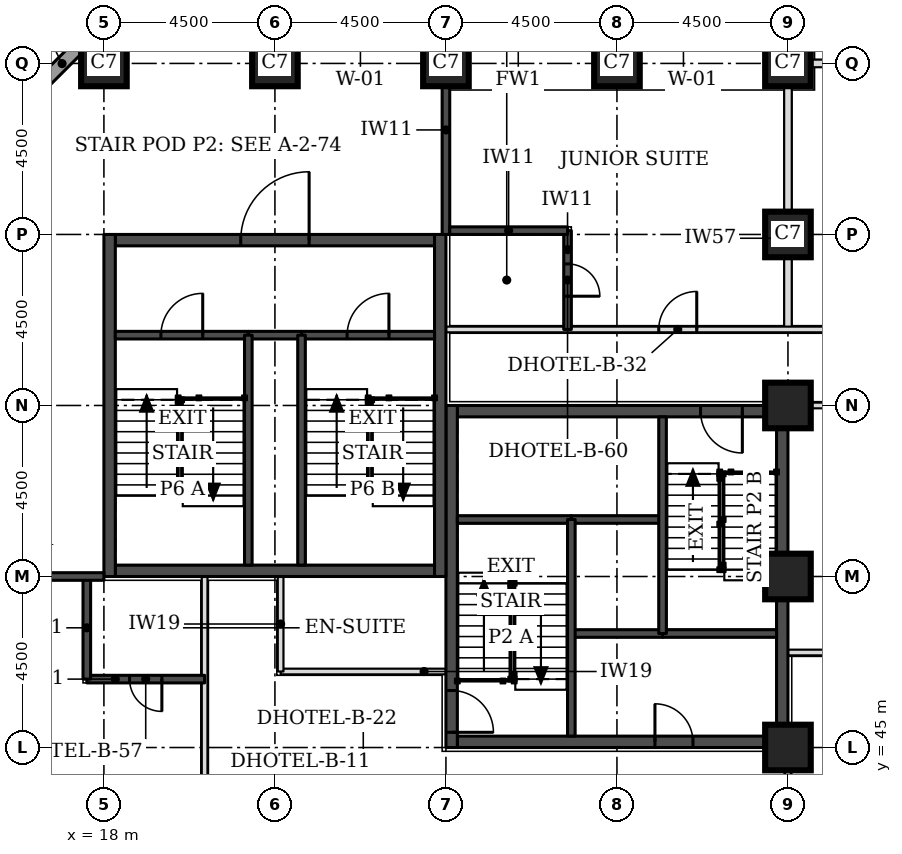
"""IFC4 building model, lengths in metres.
Left out: names, types, materials, properties, quantities, classifications, styles, units other than length and angle.
Written with IfcOpenShell. Run it as: python <this file> out.ifc"""

import sys

from ifc_helpers import new_model, si_unit, direction, frame, frame_2d, origin, origin_2d, place, context, subcontext, project, spatial, rectangle, extrude, element, fill, save


model = new_model("IFC4")
c1 = context("Model", 3, precision=1e-05, world=origin(), true_north=direction((0.0, 1.0)))
c2 = subcontext(c1, "Body", "Model", "MODEL_VIEW")
j1 = project(units=[si_unit("LENGTHUNIT", "METRE"), si_unit("PLANEANGLEUNIT", "RADIAN")], contexts=[c1])
p1 = place(None, origin())
s1 = spatial("IfcSite", under=j1, at=p1, CompositionType="ELEMENT")
p2 = place(p1, origin())
s2 = spatial("IfcBuilding", under=s1, at=p2, CompositionType="ELEMENT")
p3 = place(p2, frame((0.0, 0.0, 29.7)))
s3 = spatial("IfcBuildingStorey", under=s2, at=p3, CompositionType="ELEMENT", Elevation=29.7)
for number, where, z_axis, x_axis in (
    (1, (36.0, 45.0, 0.0), (0.0, 0.0, 1.0), (1.0, 0.0, 0.0)),
    (2, (36.0, 49.5, 0.0), (0.0, 0.0, 1.0), (1.0, 0.0, 0.0)),
    (3, (36.0, 54.0, 0.0), (0.0, 0.0, 1.0), (1.0, 0.0, 0.0)),
    (4, (36.0, 58.5, 0.0), (0.0, 0.0, 1.0), (1.0, 0.0, 0.0)),
    (5, (18.0, 63.0, 0.0), (0.0, 0.0, 1.0), (1.0, 0.0, 0.0)),
    (6, (22.5, 63.0, 0.0), (0.0, 0.0, 1.0), (1.0, 0.0, 0.0)),
    (7, (27.0, 63.0, 0.0), (0.0, 0.0, 1.0), (1.0, 0.0, 0.0)),
    (8, (31.5, 63.0, 0.0), (0.0, 0.0, 1.0), (1.0, 0.0, 0.0)),
    (9, (36.0, 63.0, 0.0), (0.0, 0.0, 1.0), (1.0, 0.0, 0.0)),
):
    element("IfcColumn", number, at=place(p3, frame(where, z_axis=z_axis, x_axis=x_axis)), inside=s3, PredefinedType="COLUMN", context=c2, shape_type="SweptSolid", body=[
        extrude(rectangle(XDim=1.2, YDim=1.2, at=origin_2d()), origin(), (0.0, 0.0, 1.0), 3.3),
    ])
p4 = place(p3, frame((27.3, 45.15, 0.0), z_axis=(0.0, 0.0, 1.0), x_axis=(1.0, 0.0, 0.0)))
e10 = element("IfcWall", 10, at=p4, inside=s3, PredefinedType="SHEAR", context=c2, shape_type="SweptSolid", body=[
    extrude(rectangle(XDim=8.4, YDim=0.3, at=frame_2d((4.2, 0.0))), origin(), (0.0, 0.0, 1.0), 3.3),
])
p5 = place(p4, frame((5.2, 0.0, 0.0)))
e11 = element("IfcOpeningElement", 11, at=p5, cuts=e10, PredefinedType="OPENING", context=c2, shape_type="SweptSolid", body=[
    extrude(rectangle(XDim=1.0, YDim=2.1, at=frame_2d((0.5, 1.05))), frame((0.0, 0.16, 0.0), z_axis=(0.0, -1.0, 0.0), x_axis=(1.0, 0.0, 0.0)), (0.0, 0.0, 1.0), 0.32),
])
p6 = place(p3, frame((27.3, 53.85, 0.0), z_axis=(0.0, 0.0, 1.0), x_axis=(1.0, 0.0, 0.0)))
e12 = element("IfcWall", 12, at=p6, inside=s3, PredefinedType="SHEAR", context=c2, shape_type="SweptSolid", body=[
    extrude(rectangle(XDim=8.4, YDim=0.3, at=frame_2d((4.2, 0.0))), origin(), (0.0, 0.0, 1.0), 3.3),
])
p7 = place(p6, frame((6.4, 0.0, 0.0)))
e13 = element("IfcOpeningElement", 13, at=p7, cuts=e12, PredefinedType="OPENING", context=c2, shape_type="SweptSolid", body=[
    extrude(rectangle(XDim=1.1, YDim=2.1, at=frame_2d((0.55, 1.05))), frame((0.0, 0.16, 0.0), z_axis=(0.0, -1.0, 0.0), x_axis=(1.0, 0.0, 0.0)), (0.0, 0.0, 1.0), 0.32),
])
p8 = place(p3, frame((27.15, 45.0, 0.0), z_axis=(0.0, 0.0, 1.0), x_axis=(0.0, 1.0, 0.0)))
e14 = element("IfcWall", 14, at=p8, inside=s3, PredefinedType="SHEAR", context=c2, shape_type="SweptSolid", body=[
    extrude(rectangle(XDim=9.0, YDim=0.3, at=frame_2d((4.5, 0.0))), origin(), (0.0, 0.0, 1.0), 3.3),
])
p9 = place(p8, frame((0.4, 0.0, 0.0)))
e15 = element("IfcOpeningElement", 15, at=p9, cuts=e14, PredefinedType="OPENING", context=c2, shape_type="SweptSolid", body=[
    extrude(rectangle(XDim=1.1, YDim=2.1, at=frame_2d((0.55, 1.05))), frame((0.0, 0.16, 0.0), z_axis=(0.0, -1.0, 0.0), x_axis=(1.0, 0.0, 0.0)), (0.0, 0.0, 1.0), 0.32),
])
p10 = place(p3, frame((35.85, 45.0, 0.0), z_axis=(0.0, 0.0, 1.0), x_axis=(0.0, 1.0, 0.0)))
e16 = element("IfcWall", 16, at=p10, inside=s3, PredefinedType="SHEAR", context=c2, shape_type="SweptSolid", body=[
    extrude(rectangle(XDim=9.0, YDim=0.3, at=frame_2d((4.5, 0.0))), origin(), (0.0, 0.0, 1.0), 3.3),
])
p11 = place(p3, frame((18.3, 49.65, 0.0), z_axis=(0.0, 0.0, 1.0), x_axis=(1.0, 0.0, 0.0)))
e17 = element("IfcWall", 17, at=p11, inside=s3, PredefinedType="SHEAR", context=c2, shape_type="SweptSolid", body=[
    extrude(rectangle(XDim=8.4, YDim=0.3, at=frame_2d((4.2, 0.0))), origin(), (0.0, 0.0, 1.0), 3.3),
])
p12 = place(p3, frame((18.3, 58.35, 0.0), z_axis=(0.0, 0.0, 1.0), x_axis=(1.0, 0.0, 0.0)))
e18 = element("IfcWall", 18, at=p12, inside=s3, PredefinedType="SHEAR", context=c2, shape_type="SweptSolid", body=[
    extrude(rectangle(XDim=8.4, YDim=0.3, at=frame_2d((4.2, 0.0))), origin(), (0.0, 0.0, 1.0), 3.3),
])
p13 = place(p12, frame((3.3, 0.0, 0.0)))
e19 = element("IfcOpeningElement", 19, at=p13, cuts=e18, PredefinedType="OPENING", context=c2, shape_type="SweptSolid", body=[
    extrude(rectangle(XDim=1.8, YDim=2.1, at=frame_2d((0.9, 1.05))), frame((0.0, 0.16, 0.0), z_axis=(0.0, -1.0, 0.0), x_axis=(1.0, 0.0, 0.0)), (0.0, 0.0, 1.0), 0.32),
])
for number, where, z_axis, x_axis in (
    (20, (18.15, 49.5, 0.0), (0.0, 0.0, 1.0), (0.0, 1.0, 0.0)),
    (21, (26.85, 49.5, 0.0), (0.0, 0.0, 1.0), (0.0, 1.0, 0.0)),
):
    element("IfcWall", number, at=place(p3, frame(where, z_axis=z_axis, x_axis=x_axis)), inside=s3, PredefinedType="SHEAR", context=c2, shape_type="SweptSolid", body=[
        extrude(rectangle(XDim=9.0, YDim=0.3, at=frame_2d((4.5, 0.0))), origin(), (0.0, 0.0, 1.0), 3.3),
    ])
p14 = place(p3, frame((17.73, 63.826, 0.0), z_axis=(0.0, 0.0, 1.0), x_axis=(-0.707106781187, -0.707106781187, 0.0)))
e22 = element("IfcWall", 22, at=p14, inside=s3, PredefinedType="STANDARD", context=c2, shape_type="SweptSolid", body=[
    extrude(rectangle(XDim=7.151, YDim=0.35, at=frame_2d((3.576, 0.0))), origin(), (0.0, 0.0, 1.0), 3.055),
])
p15 = place(p14, frame((1.926, 0.0, 0.8)))
e23 = element("IfcOpeningElement", 23, at=p15, cuts=e22, PredefinedType="OPENING", context=c2, shape_type="SweptSolid", body=[
    extrude(rectangle(XDim=3.3, YDim=1.5, at=frame_2d((1.65, 0.75))), frame((0.0, 0.185, 0.0), z_axis=(0.0, -1.0, 0.0), x_axis=(1.0, 0.0, 0.0)), (0.0, 0.0, 1.0), 0.37),
])
p16 = place(p3, frame((36.0, 56.0, 0.0), z_axis=(0.0, 0.0, 1.0), x_axis=(0.0, 1.0, 0.0)))
e24 = element("IfcWall", 24, at=p16, inside=s3, PredefinedType="PARTITIONING", context=c2, shape_type="SweptSolid", body=[
    extrude(rectangle(XDim=6.4, YDim=0.2, at=frame_2d((3.2, 0.0))), origin(), (0.0, 0.0, 1.0), 2.33),
])
p17 = place(p3, frame((36.6, 63.0, 0.0), z_axis=(0.0, 0.0, 1.0), x_axis=(1.0, 0.0, 0.0)))
e25 = element("IfcWall", 25, at=p17, inside=s3, PredefinedType="PARTITIONING", context=c2, shape_type="SweptSolid", body=[
    extrude(rectangle(XDim=6.4, YDim=0.2, at=frame_2d((3.2, 0.0))), origin(), (0.0, 0.0, 1.0), 3.08),
])
p18 = place(p3, frame((20.65, 23.65, 0.0), z_axis=(0.0, 0.0, 1.0), x_axis=(0.0, 1.0, 0.0)))
e26 = element("IfcWall", 26, at=p18, inside=s3, PredefinedType="PARTITIONING", context=c2, shape_type="SweptSolid", body=[
    extrude(rectangle(XDim=25.85, YDim=0.15, at=frame_2d((12.925, 0.0))), origin(), (0.0, 0.0, 1.0), 3.08),
])
p19 = place(p18, frame((1.5, 0.0, 0.0)))
e27 = element("IfcOpeningElement", 27, at=p19, cuts=e26, PredefinedType="OPENING", context=c2, shape_type="SweptSolid", body=[
    extrude(rectangle(XDim=1.0, YDim=2.1, at=frame_2d((0.5, 1.05))), frame((0.0, 0.085, 0.0), z_axis=(0.0, -1.0, 0.0), x_axis=(1.0, 0.0, 0.0)), (0.0, 0.0, 1.0), 0.17),
])
p20 = place(p18, frame((13.45, 0.0, 0.0)))
e28 = element("IfcOpeningElement", 28, at=p20, cuts=e26, PredefinedType="OPENING", context=c2, shape_type="SweptSolid", body=[
    extrude(rectangle(XDim=1.0, YDim=2.1, at=frame_2d((0.5, 1.05))), frame((0.0, 0.085, 0.0), z_axis=(0.0, -1.0, 0.0), x_axis=(1.0, 0.0, 0.0)), (0.0, 0.0, 1.0), 0.17),
])
p21 = place(p18, frame((19.5, 0.0, 0.0)))
e29 = element("IfcOpeningElement", 29, at=p21, cuts=e26, PredefinedType="OPENING", context=c2, shape_type="SweptSolid", body=[
    extrude(rectangle(XDim=1.0, YDim=2.1, at=frame_2d((0.5, 1.05))), frame((0.0, 0.085, 0.0), z_axis=(0.0, -1.0, 0.0), x_axis=(1.0, 0.0, 0.0)), (0.0, 0.0, 1.0), 0.17),
])
p22 = place(p3, frame((36.0, 40.55, 0.0), z_axis=(0.0, 0.0, 1.0), x_axis=(0.0, 1.0, 0.0)))
e30 = element("IfcWall", 30, at=p22, inside=s3, PredefinedType="PARTITIONING", context=c2, shape_type="SweptSolid", body=[
    extrude(rectangle(XDim=4.4, YDim=0.15, at=frame_2d((2.2, 0.0))), origin(), (0.0, 0.0, 1.0), 2.33),
])
p23 = place(p3, frame((22.65, 47.0, 0.0), z_axis=(0.0, 0.0, 1.0), x_axis=(1.0, 0.0, 0.0)))
e31 = element("IfcWall", 31, at=p23, inside=s3, PredefinedType="PARTITIONING", context=c2, shape_type="SweptSolid", body=[
    extrude(rectangle(XDim=4.35, YDim=0.15, at=frame_2d((2.175, 0.0))), origin(), (0.0, 0.0, 1.0), 3.08),
])
p24 = place(p3, frame((22.65, 47.0, 0.0), z_axis=(0.0, 0.0, 1.0), x_axis=(0.0, 1.0, 0.0)))
e32 = element("IfcWall", 32, at=p24, inside=s3, PredefinedType="PARTITIONING", context=c2, shape_type="SweptSolid", body=[
    extrude(rectangle(XDim=2.5, YDim=0.15, at=frame_2d((1.25, 0.0))), origin(), (0.0, 0.0, 1.0), 3.08),
])
p25 = place(p3, frame((36.05, 54.0, 0.0), z_axis=(0.0, 0.0, 1.0), x_axis=(1.0, 0.0, 0.0)))
e33 = element("IfcWall", 33, at=p25, inside=s3, PredefinedType="PARTITIONING", context=c2, shape_type="SweptSolid", body=[
    extrude(rectangle(XDim=6.95, YDim=0.15, at=frame_2d((3.475, 0.0))), origin(), (0.0, 0.0, 1.0), 3.08),
])
p26 = place(p3, frame((27.0, 56.0, 0.0), z_axis=(0.0, 0.0, 1.0), x_axis=(1.0, 0.0, 0.0)))
e34 = element("IfcWall", 34, at=p26, inside=s3, PredefinedType="PARTITIONING", context=c2, shape_type="SweptSolid", body=[
    extrude(rectangle(XDim=16.0, YDim=0.15, at=frame_2d((8.0, 0.0))), origin(), (0.0, 0.0, 1.0), 3.08),
])
p27 = place(p26, frame((5.6, 0.0, 0.0)))
e35 = element("IfcOpeningElement", 35, at=p27, cuts=e34, PredefinedType="OPENING", context=c2, shape_type="SweptSolid", body=[
    extrude(rectangle(XDim=1.0, YDim=2.1, at=frame_2d((0.5, 1.05))), frame((0.0, 0.085, 0.0), z_axis=(0.0, -1.0, 0.0), x_axis=(1.0, 0.0, 0.0)), (0.0, 0.0, 1.0), 0.17),
])
p28 = place(p3, frame((17.55, 46.8, 0.0), z_axis=(0.0, 0.0, 1.0), x_axis=(1.0, 0.0, 0.0)))
e36 = element("IfcWall", 36, at=p28, inside=s3, PredefinedType="SOLIDWALL", context=c2, shape_type="SweptSolid", body=[
    extrude(rectangle(XDim=3.1, YDim=0.2, at=frame_2d((1.55, 0.0))), origin(), (0.0, 0.0, 1.0), 3.08),
])
p29 = place(p28, frame((1.125, 0.0, 0.0)))
e37 = element("IfcOpeningElement", 37, at=p29, cuts=e36, PredefinedType="OPENING", context=c2, shape_type="SweptSolid", body=[
    extrude(rectangle(XDim=0.85, YDim=2.1, at=frame_2d((0.425, 1.05))), frame((0.0, 0.11, 0.0), z_axis=(0.0, -1.0, 0.0), x_axis=(1.0, 0.0, 0.0)), (0.0, 0.0, 1.0), 0.22),
])
p30 = place(p3, frame((17.55, 46.8, 0.0), z_axis=(0.0, 0.0, 1.0), x_axis=(0.0, 1.0, 0.0)))
e38 = element("IfcWall", 38, at=p30, inside=s3, PredefinedType="SOLIDWALL", context=c2, shape_type="SweptSolid", body=[
    extrude(rectangle(XDim=2.7, YDim=0.2, at=frame_2d((1.35, 0.0))), origin(), (0.0, 0.0, 1.0), 3.08),
])
for number, where, z_axis, x_axis in (
    (39, (14.1, 49.5, 0.0), (0.0, 0.0, 1.0), (1.0, 0.0, 0.0)),
    (40, (27.0, 58.5, 0.0), (0.0, 0.0, 1.0), (0.0, 1.0, 0.0)),
):
    element("IfcWall", number, at=place(p3, frame(where, z_axis=z_axis, x_axis=x_axis)), inside=s3, PredefinedType="SOLIDWALL", context=c2, shape_type="SweptSolid", body=[
        extrude(rectangle(XDim=3.9, YDim=0.2, at=frame_2d((1.95, 0.0))), origin(), (0.0, 0.0, 1.0), 3.08),
    ])
p31 = place(p3, frame((30.2, 56.0, 0.0), z_axis=(0.0, 0.0, 1.0), x_axis=(0.0, 1.0, 0.0)))
e41 = element("IfcWall", 41, at=p31, inside=s3, PredefinedType="SOLIDWALL", context=c2, shape_type="SweptSolid", body=[
    extrude(rectangle(XDim=2.6, YDim=0.2, at=frame_2d((1.3, 0.0))), origin(), (0.0, 0.0, 1.0), 3.08),
])
p32 = place(p31, frame((0.875, 0.0, 0.0)))
e42 = element("IfcOpeningElement", 42, at=p32, cuts=e41, PredefinedType="OPENING", context=c2, shape_type="SweptSolid", body=[
    extrude(rectangle(XDim=0.85, YDim=2.1, at=frame_2d((0.425, 1.05))), frame((0.0, 0.11, 0.0), z_axis=(0.0, -1.0, 0.0), x_axis=(1.0, 0.0, 0.0)), (0.0, 0.0, 1.0), 0.22),
])
p33 = place(p3, frame((27.1, 58.6, 0.0), z_axis=(0.0, 0.0, 1.0), x_axis=(1.0, 0.0, 0.0)))
e43 = element("IfcWall", 43, at=p33, inside=s3, PredefinedType="SOLIDWALL", context=c2, shape_type="SweptSolid", body=[
    extrude(rectangle(XDim=3.1, YDim=0.2, at=frame_2d((1.55, 0.0))), origin(), (0.0, 0.0, 1.0), 3.08),
])
p34 = place(p3, frame((36.0, 47.5, 0.0), z_axis=(0.0, 0.0, 1.0), x_axis=(1.0, 0.0, 0.0)))
e44 = element("IfcWall", 44, at=p34, inside=s3, PredefinedType="PARTITIONING", context=c2, shape_type="SweptSolid", body=[
    extrude(rectangle(XDim=7.0, YDim=0.15, at=frame_2d((3.5, 0.0))), origin(), (0.0, 0.0, 1.0), 3.08),
])
p35 = place(p3, frame((30.3, 48.0, 0.0), z_axis=(0.0, 0.0, 1.0), x_axis=(1.0, 0.0, 0.0)))
e45 = element("IfcWall", 45, at=p35, inside=s3, PredefinedType="SOLIDWALL", context=c2, shape_type="SweptSolid", body=[
    extrude(rectangle(XDim=2.4, YDim=0.2, at=frame_2d((1.2, 0.0))), origin(), (0.0, 0.0, 1.0), 3.08),
])
p36 = place(p3, frame((32.7, 48.0, 0.0), z_axis=(0.0, 0.0, 1.0), x_axis=(1.0, 0.0, 0.0)))
e46 = element("IfcWall", 46, at=p36, inside=s3, PredefinedType="SOLIDWALL", context=c2, shape_type="SweptSolid", body=[
    extrude(rectangle(XDim=3.0, YDim=0.2, at=frame_2d((1.5, 0.0))), origin(), (0.0, 0.0, 1.0), 3.08),
])
p37 = place(p3, frame((30.3, 51.0, 0.0), z_axis=(0.0, 0.0, 1.0), x_axis=(1.0, 0.0, 0.0)))
e47 = element("IfcWall", 47, at=p37, inside=s3, PredefinedType="SOLIDWALL", context=c2, shape_type="SweptSolid", body=[
    extrude(rectangle(XDim=2.4, YDim=0.2, at=frame_2d((1.2, 0.0))), origin(), (0.0, 0.0, 1.0), 3.3),
])
p38 = place(p3, frame((27.3, 51.0, 0.0), z_axis=(0.0, 0.0, 1.0), x_axis=(1.0, 0.0, 0.0)))
e48 = element("IfcWall", 48, at=p38, inside=s3, PredefinedType="SOLIDWALL", context=c2, shape_type="SweptSolid", body=[
    extrude(rectangle(XDim=3.0, YDim=0.2, at=frame_2d((1.5, 0.0))), origin(), (0.0, 0.0, 1.0), 3.08),
])
for number, where, z_axis, x_axis in (
    (49, (30.3, 45.3, 0.0), (0.0, 0.0, 1.0), (0.0, 1.0, 0.0)),
    (50, (32.7, 48.0, 0.0), (0.0, 0.0, 1.0), (0.0, 1.0, 0.0)),
):
    element("IfcWall", number, at=place(p3, frame(where, z_axis=z_axis, x_axis=x_axis)), inside=s3, PredefinedType="SOLIDWALL", context=c2, shape_type="SweptSolid", body=[
        extrude(rectangle(XDim=5.7, YDim=0.2, at=frame_2d((2.85, 0.0))), origin(), (0.0, 0.0, 1.0), 3.08),
    ])
p39 = place(p3, frame((21.8, 55.85, 0.0), z_axis=(0.0, 0.0, 1.0), x_axis=(1.0, 0.0, 0.0)))
e51 = element("IfcWall", 51, at=p39, inside=s3, PredefinedType="SOLIDWALL", context=c2, shape_type="SweptSolid", body=[
    extrude(rectangle(XDim=1.4, YDim=0.2, at=frame_2d((0.7, 0.0))), origin(), (0.0, 0.0, 1.0), 3.08),
])
p40 = place(p3, frame((18.3, 55.85, 0.0), z_axis=(0.0, 0.0, 1.0), x_axis=(1.0, 0.0, 0.0)))
e52 = element("IfcWall", 52, at=p40, inside=s3, PredefinedType="SOLIDWALL", context=c2, shape_type="SweptSolid", body=[
    extrude(rectangle(XDim=3.5, YDim=0.2, at=frame_2d((1.75, 0.0))), origin(), (0.0, 0.0, 1.0), 3.08),
])
p41 = place(p40, frame((1.2, 0.0, 0.0)))
e53 = element("IfcOpeningElement", 53, at=p41, cuts=e52, PredefinedType="OPENING", context=c2, shape_type="SweptSolid", body=[
    extrude(rectangle(XDim=1.1, YDim=2.1, at=frame_2d((0.55, 1.05))), frame((0.0, 0.11, 0.0), z_axis=(0.0, -1.0, 0.0), x_axis=(1.0, 0.0, 0.0)), (0.0, 0.0, 1.0), 0.22),
])
p42 = place(p3, frame((23.2, 55.85, 0.0), z_axis=(0.0, 0.0, 1.0), x_axis=(1.0, 0.0, 0.0)))
e54 = element("IfcWall", 54, at=p42, inside=s3, PredefinedType="SOLIDWALL", context=c2, shape_type="SweptSolid", body=[
    extrude(rectangle(XDim=3.5, YDim=0.2, at=frame_2d((1.75, 0.0))), origin(), (0.0, 0.0, 1.0), 3.08),
])
p43 = place(p42, frame((1.2, 0.0, 0.0)))
e55 = element("IfcOpeningElement", 55, at=p43, cuts=e54, PredefinedType="OPENING", context=c2, shape_type="SweptSolid", body=[
    extrude(rectangle(XDim=1.1, YDim=2.1, at=frame_2d((0.55, 1.05))), frame((0.0, 0.11, 0.0), z_axis=(0.0, -1.0, 0.0), x_axis=(1.0, 0.0, 0.0)), (0.0, 0.0, 1.0), 0.22),
])
for number, where, z_axis, x_axis in (
    (56, (21.8, 49.8, 0.0), (0.0, 0.0, 1.0), (0.0, 1.0, 0.0)),
    (57, (23.2, 49.8, 0.0), (0.0, 0.0, 1.0), (0.0, 1.0, 0.0)),
):
    element("IfcWall", number, at=place(p3, frame(where, z_axis=z_axis, x_axis=x_axis)), inside=s3, PredefinedType="SOLIDWALL", context=c2, shape_type="SweptSolid", body=[
        extrude(rectangle(XDim=6.05, YDim=0.2, at=frame_2d((3.025, 0.0))), origin(), (0.0, 0.0, 1.0), 3.08),
    ])
p44 = place(p29, frame((0.85, 0.0, 0.0), z_axis=(0.0, 0.0, 1.0), x_axis=(-1.0, 0.0, 0.0)))
e58 = element("IfcDoor", 58, at=p44, inside=s3, OperationType="SINGLE_SWING_LEFT", PredefinedType="DOOR", context=c2, shape_type="SweptSolid", body=[
    extrude(rectangle(XDim=0.85, YDim=2.1, at=frame_2d((0.425, 1.05))), frame((0.0, 0.025, 0.0), z_axis=(0.0, -1.0, 0.0), x_axis=(1.0, 0.0, 0.0)), (0.0, 0.0, 1.0), 0.05),
])
fill(e37, e58)
p45 = place(p27, origin())
e59 = element("IfcDoor", 59, at=p45, inside=s3, OperationType="SINGLE_SWING_RIGHT", PredefinedType="DOOR", context=c2, shape_type="SweptSolid", body=[
    extrude(rectangle(XDim=1.0, YDim=2.1, at=frame_2d((0.5, 1.05))), frame((0.0, 0.025, 0.0), z_axis=(0.0, -1.0, 0.0), x_axis=(1.0, 0.0, 0.0)), (0.0, 0.0, 1.0), 0.05),
])
fill(e35, e59)
p46 = place(p32, frame((0.85, 0.0, 0.0), z_axis=(0.0, 0.0, 1.0), x_axis=(-1.0, 0.0, 0.0)))
e60 = element("IfcDoor", 60, at=p46, inside=s3, OperationType="SINGLE_SWING_RIGHT", PredefinedType="DOOR", context=c2, shape_type="SweptSolid", body=[
    extrude(rectangle(XDim=0.85, YDim=2.1, at=frame_2d((0.425, 1.05))), frame((0.0, 0.025, 0.0), z_axis=(0.0, -1.0, 0.0), x_axis=(1.0, 0.0, 0.0)), (0.0, 0.0, 1.0), 0.05),
])
fill(e42, e60)
p47 = place(p9, frame((1.1, 0.0, 0.0), z_axis=(0.0, 0.0, 1.0), x_axis=(-1.0, 0.0, 0.0)))
e61 = element("IfcDoor", 61, at=p47, inside=s3, OperationType="SINGLE_SWING_RIGHT", PredefinedType="DOOR", context=c2, shape_type="SweptSolid", body=[
    extrude(rectangle(XDim=1.1, YDim=2.1, at=frame_2d((0.55, 1.05))), frame((0.0, 0.025, 0.0), z_axis=(0.0, -1.0, 0.0), x_axis=(1.0, 0.0, 0.0)), (0.0, 0.0, 1.0), 0.05),
])
fill(e15, e61)
p48 = place(p7, frame((1.1, 0.0, 0.0), z_axis=(0.0, 0.0, 1.0), x_axis=(-1.0, 0.0, 0.0)))
e62 = element("IfcDoor", 62, at=p48, inside=s3, OperationType="SINGLE_SWING_LEFT", PredefinedType="DOOR", context=c2, shape_type="SweptSolid", body=[
    extrude(rectangle(XDim=1.1, YDim=2.1, at=frame_2d((0.55, 1.05))), frame((0.0, 0.025, 0.0), z_axis=(0.0, -1.0, 0.0), x_axis=(1.0, 0.0, 0.0)), (0.0, 0.0, 1.0), 0.05),
])
fill(e13, e62)
p49 = place(p5, origin())
e63 = element("IfcDoor", 63, at=p49, inside=s3, OperationType="SINGLE_SWING_LEFT", PredefinedType="DOOR", context=c2, shape_type="SweptSolid", body=[
    extrude(rectangle(XDim=1.0, YDim=2.1, at=frame_2d((0.5, 1.05))), frame((0.0, 0.025, 0.0), z_axis=(0.0, -1.0, 0.0), x_axis=(1.0, 0.0, 0.0)), (0.0, 0.0, 1.0), 0.05),
])
fill(e11, e63)
p50 = place(p41, origin())
e64 = element("IfcDoor", 64, at=p50, inside=s3, OperationType="SINGLE_SWING_RIGHT", PredefinedType="DOOR", context=c2, shape_type="SweptSolid", body=[
    extrude(rectangle(XDim=1.1, YDim=2.1, at=frame_2d((0.55, 1.05))), frame((0.0, 0.025, 0.0), z_axis=(0.0, -1.0, 0.0), x_axis=(1.0, 0.0, 0.0)), (0.0, 0.0, 1.0), 0.05),
])
fill(e53, e64)
p51 = place(p43, origin())
e65 = element("IfcDoor", 65, at=p51, inside=s3, OperationType="SINGLE_SWING_RIGHT", PredefinedType="DOOR", context=c2, shape_type="SweptSolid", body=[
    extrude(rectangle(XDim=1.1, YDim=2.1, at=frame_2d((0.55, 1.05))), frame((0.0, 0.025, 0.0), z_axis=(0.0, -1.0, 0.0), x_axis=(1.0, 0.0, 0.0)), (0.0, 0.0, 1.0), 0.05),
])
fill(e55, e65)
p52 = place(p13, origin())
e66 = element("IfcDoor", 66, at=p52, inside=s3, OperationType="SINGLE_SWING_RIGHT", PredefinedType="DOOR", context=c2, shape_type="SweptSolid", body=[
    extrude(rectangle(XDim=1.8, YDim=2.1, at=frame_2d((0.9, 1.05))), frame((0.0, 0.025, 0.0), z_axis=(0.0, -1.0, 0.0), x_axis=(1.0, 0.0, 0.0)), (0.0, 0.0, 1.0), 0.05),
])
fill(e19, e66)
save(model, sys.argv[1])
